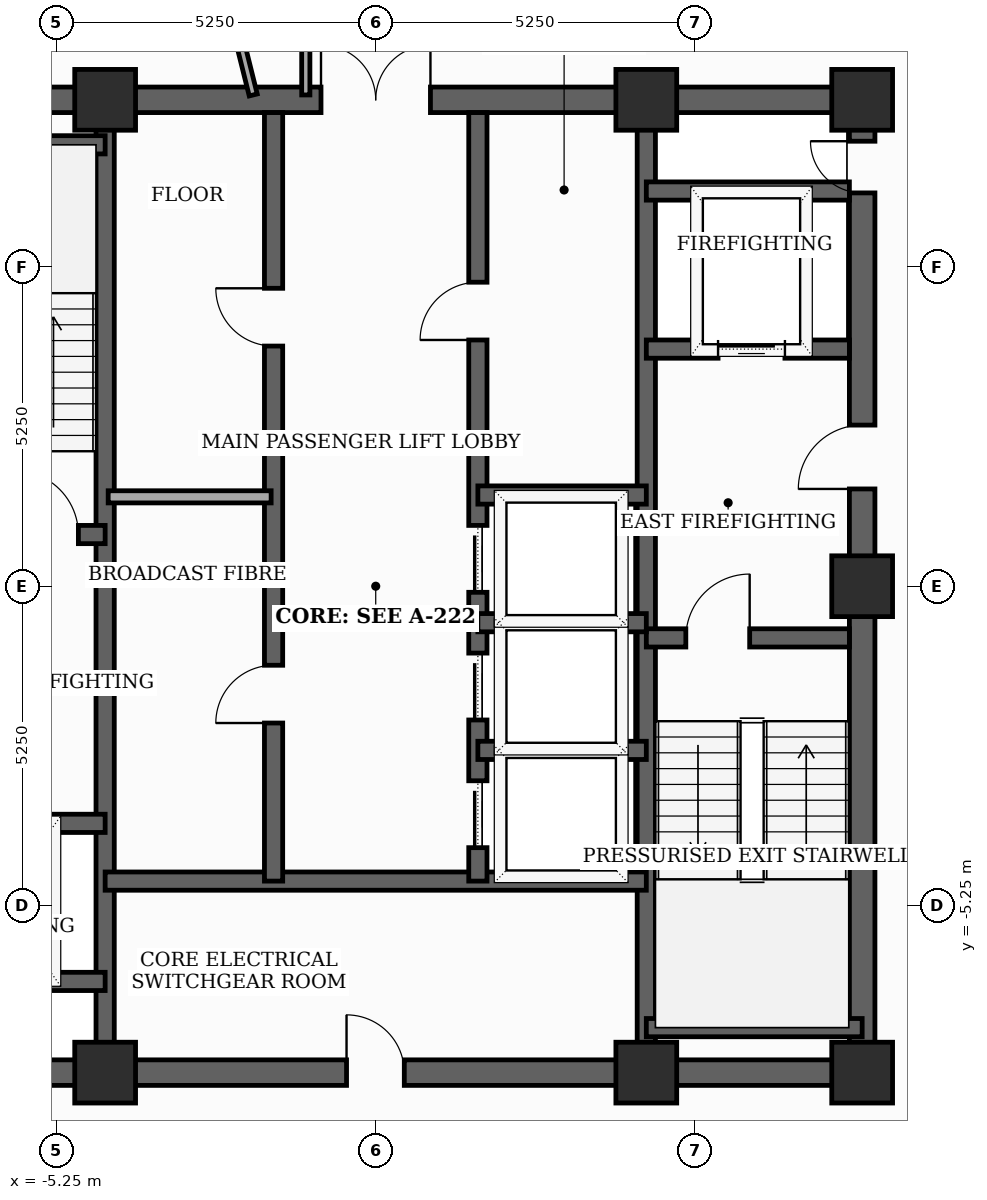
"""IFC4 building model, lengths in metres.
Left out: names, types, materials, properties, quantities, classifications, styles, units other than length and angle.
Written with IfcOpenShell. Run it as: python <this file> out.ifc"""

import sys

from ifc_helpers import new_model, si_unit, direction, frame, frame_2d, origin, origin_2d, place, context, subcontext, project, spatial, rectangle, extrude, element, fill, save


model = new_model("IFC4")
c1 = context("Model", 3, precision=1e-05, world=origin(), true_north=direction((0.0, 1.0)))
c2 = subcontext(c1, "Body", "Model", "MODEL_VIEW")
j1 = project(units=[si_unit("LENGTHUNIT", "METRE"), si_unit("PLANEANGLEUNIT", "RADIAN")], contexts=[c1])
p1 = place(None, origin())
s1 = spatial("IfcSite", under=j1, at=p1, CompositionType="ELEMENT")
p2 = place(p1, origin())
s2 = spatial("IfcBuilding", under=s1, at=p2, CompositionType="ELEMENT")
p3 = place(p2, frame((0.0, 0.0, 248.5)))
s3 = spatial("IfcBuildingStorey", under=s2, at=p3, CompositionType="ELEMENT", Elevation=248.5)
for number, where, z_axis, x_axis in (
    (1, (-4.45, -8.0, 0.0), (0.0, 0.0, 1.0), (1.0, 0.0, 0.0)),
    (2, (4.45, -8.0, 0.0), (0.0, 0.0, 1.0), (1.0, 0.0, 0.0)),
    (3, (8.0, -8.0, 0.0), (0.0, 0.0, 1.0), (1.0, 0.0, 0.0)),
    (4, (8.0, 0.0, 0.0), (0.0, 0.0, 1.0), (1.0, 0.0, 0.0)),
    (5, (8.0, 8.0, 0.0), (0.0, 0.0, 1.0), (1.0, 0.0, 0.0)),
    (6, (4.45, 8.0, 0.0), (0.0, 0.0, 1.0), (1.0, 0.0, 0.0)),
    (7, (-4.45, 8.0, 0.0), (0.0, 0.0, 1.0), (1.0, 0.0, 0.0)),
):
    element("IfcColumn", number, at=place(p3, frame(where, z_axis=z_axis, x_axis=x_axis)), inside=s3, PredefinedType="COLUMN", context=c2, shape_type="SweptSolid", body=[
        extrude(rectangle(XDim=1.0, YDim=1.0, at=origin_2d()), origin(), (0.0, 0.0, 1.0), 3.7),
    ])
p4 = place(p3, frame((8.0, -8.0, 0.0), z_axis=(0.0, 0.0, 1.0), x_axis=(0.0, 1.0, 0.0)))
e8 = element("IfcWall", 8, at=p4, inside=s3, PredefinedType="SHEAR", context=c2, shape_type="SweptSolid", body=[
    extrude(rectangle(XDim=16.0, YDim=0.42, at=frame_2d((8.0, 0.0))), origin(), (0.0, 0.0, 1.0), 3.5),
])
p5 = place(p4, frame((9.6, 0.0, 0.0)))
e9 = element("IfcOpeningElement", 9, at=p5, cuts=e8, PredefinedType="OPENING", context=c2, shape_type="SweptSolid", body=[
    extrude(rectangle(XDim=1.05, YDim=2.15, at=frame_2d((0.525, 1.075))), frame((0.0, 0.22, 0.0), z_axis=(0.0, -1.0, 0.0), x_axis=(1.0, 0.0, 0.0)), (0.0, 0.0, 1.0), 0.44),
])
p6 = place(p4, frame((14.469, 0.0, 0.0)))
e10 = element("IfcOpeningElement", 10, at=p6, cuts=e8, PredefinedType="OPENING", context=c2, shape_type="SweptSolid", body=[
    extrude(rectangle(XDim=0.85, YDim=2.02, at=frame_2d((0.425, 1.01))), frame((0.0, 0.22, 0.0), z_axis=(0.0, -1.0, 0.0), x_axis=(1.0, 0.0, 0.0)), (0.0, 0.0, 1.0), 0.44),
])
p7 = place(p3, frame((-8.0, -8.0, 0.0), z_axis=(0.0, 0.0, 1.0), x_axis=(1.0, 0.0, 0.0)))
e11 = element("IfcWall", 11, at=p7, inside=s3, PredefinedType="SHEAR", context=c2, shape_type="SweptSolid", body=[
    extrude(rectangle(XDim=16.0, YDim=0.42, at=frame_2d((8.0, 0.0))), origin(), (0.0, 0.0, 1.0), 3.5),
])
p8 = place(p7, frame((7.52, 0.0, 0.0)))
e12 = element("IfcOpeningElement", 12, at=p8, cuts=e11, PredefinedType="OPENING", context=c2, shape_type="SweptSolid", body=[
    extrude(rectangle(XDim=0.95, YDim=2.1, at=frame_2d((0.475, 1.05))), frame((0.0, 0.22, 0.0), z_axis=(0.0, -1.0, 0.0), x_axis=(1.0, 0.0, 0.0)), (0.0, 0.0, 1.0), 0.44),
])
p9 = place(p3, frame((-8.0, 8.0, 0.0), z_axis=(0.0, 0.0, 1.0), x_axis=(1.0, 0.0, 0.0)))
e13 = element("IfcWall", 13, at=p9, inside=s3, PredefinedType="SHEAR", context=c2, shape_type="SweptSolid", body=[
    extrude(rectangle(XDim=16.0, YDim=0.42, at=frame_2d((8.0, 0.0))), origin(), (0.0, 0.0, 1.0), 3.5),
])
p10 = place(p9, frame((7.1, 0.0, 0.0)))
e14 = element("IfcOpeningElement", 14, at=p10, cuts=e13, PredefinedType="OPENING", context=c2, shape_type="SweptSolid", body=[
    extrude(rectangle(XDim=1.8, YDim=2.15, at=frame_2d((0.9, 1.075))), frame((0.0, 0.22, 0.0), z_axis=(0.0, -1.0, 0.0), x_axis=(1.0, 0.0, 0.0)), (0.0, 0.0, 1.0), 0.44),
])
for number, where, z_axis, x_axis in (
    (15, (-4.45, -7.79, 0.0), (0.0, 0.0, 1.0), (0.0, 1.0, 0.0)),
    (16, (4.45, -7.79, 0.0), (0.0, 0.0, 1.0), (0.0, 1.0, 0.0)),
):
    element("IfcWall", number, at=place(p3, frame(where, z_axis=z_axis, x_axis=x_axis)), inside=s3, PredefinedType="SHEAR", context=c2, shape_type="SweptSolid", body=[
        extrude(rectangle(XDim=15.58, YDim=0.3, at=frame_2d((7.79, 0.0))), origin(), (0.0, 0.0, 1.0), 3.5),
    ])
p11 = place(p3, frame((-7.79, 0.85, 0.0), z_axis=(0.0, 0.0, 1.0), x_axis=(1.0, 0.0, 0.0)))
e17 = element("IfcWall", 17, at=p11, inside=s3, PredefinedType="SHEAR", context=c2, shape_type="SweptSolid", body=[
    extrude(rectangle(XDim=3.34, YDim=0.3, at=frame_2d((1.67, 0.0))), origin(), (0.0, 0.0, 1.0), 3.5),
])
p12 = place(p11, frame((1.85, 0.0, 0.0)))
e18 = element("IfcOpeningElement", 18, at=p12, cuts=e17, PredefinedType="OPENING", context=c2, shape_type="SweptSolid", body=[
    extrude(rectangle(XDim=1.05, YDim=2.15, at=frame_2d((0.525, 1.075))), frame((0.0, 0.16, 0.0), z_axis=(0.0, -1.0, 0.0), x_axis=(1.0, 0.0, 0.0)), (0.0, 0.0, 1.0), 0.32),
])
p13 = place(p3, frame((-7.79, 7.26, 0.0), z_axis=(0.0, 0.0, 1.0), x_axis=(1.0, 0.0, 0.0)))
e19 = element("IfcWall", 19, at=p13, inside=s3, PredefinedType="SHEAR", context=c2, shape_type="SweptSolid", body=[
    extrude(rectangle(XDim=3.34, YDim=0.3, at=frame_2d((1.67, 0.0))), origin(), (0.0, 0.0, 1.0), 3.5),
])
p14 = place(p3, frame((4.45, -0.85, 0.0), z_axis=(0.0, 0.0, 1.0), x_axis=(1.0, 0.0, 0.0)))
e20 = element("IfcWall", 20, at=p14, inside=s3, PredefinedType="SHEAR", context=c2, shape_type="SweptSolid", body=[
    extrude(rectangle(XDim=3.34, YDim=0.3, at=frame_2d((1.67, 0.0))), origin(), (0.0, 0.0, 1.0), 3.5),
])
p15 = place(p14, frame((0.65, 0.0, 0.0)))
e21 = element("IfcOpeningElement", 21, at=p15, cuts=e20, PredefinedType="OPENING", context=c2, shape_type="SweptSolid", body=[
    extrude(rectangle(XDim=1.05, YDim=2.15, at=frame_2d((0.525, 1.075))), frame((0.0, 0.16, 0.0), z_axis=(0.0, -1.0, 0.0), x_axis=(1.0, 0.0, 0.0)), (0.0, 0.0, 1.0), 0.32),
])
p16 = place(p3, frame((4.45, -7.26, 0.0), z_axis=(0.0, 0.0, 1.0), x_axis=(1.0, 0.0, 0.0)))
e22 = element("IfcWall", 22, at=p16, inside=s3, PredefinedType="SHEAR", context=c2, shape_type="SweptSolid", body=[
    extrude(rectangle(XDim=3.55, YDim=0.3, at=frame_2d((1.775, 0.0))), origin(), (0.0, 0.0, 1.0), 3.5),
])
p17 = place(p3, frame((-7.79, -3.9, 0.0), z_axis=(0.0, 0.0, 1.0), x_axis=(1.0, 0.0, 0.0)))
e23 = element("IfcWall", 23, at=p17, inside=s3, PredefinedType="SHEAR", context=c2, shape_type="SweptSolid", body=[
    extrude(rectangle(XDim=3.34, YDim=0.3, at=frame_2d((1.67, 0.0))), origin(), (0.0, 0.0, 1.0), 3.5),
])
p18 = place(p17, frame((1.27, 0.0, 0.0)))
e24 = element("IfcOpeningElement", 24, at=p18, cuts=e23, PredefinedType="OPENING", context=c2, shape_type="SweptSolid", body=[
    extrude(rectangle(XDim=1.1, YDim=2.1, at=frame_2d((0.55, 1.05))), frame((0.0, 0.16, 0.0), z_axis=(0.0, -1.0, 0.0), x_axis=(1.0, 0.0, 0.0)), (0.0, 0.0, 1.0), 0.32),
])
p19 = place(p3, frame((-7.79, -6.5, 0.0), z_axis=(0.0, 0.0, 1.0), x_axis=(1.0, 0.0, 0.0)))
e25 = element("IfcWall", 25, at=p19, inside=s3, PredefinedType="SHEAR", context=c2, shape_type="SweptSolid", body=[
    extrude(rectangle(XDim=3.34, YDim=0.3, at=frame_2d((1.67, 0.0))), origin(), (0.0, 0.0, 1.0), 3.5),
])
p20 = place(p3, frame((4.45, 3.9, 0.0), z_axis=(0.0, 0.0, 1.0), x_axis=(1.0, 0.0, 0.0)))
e26 = element("IfcWall", 26, at=p20, inside=s3, PredefinedType="SHEAR", context=c2, shape_type="SweptSolid", body=[
    extrude(rectangle(XDim=3.34, YDim=0.3, at=frame_2d((1.67, 0.0))), origin(), (0.0, 0.0, 1.0), 3.5),
])
p21 = place(p20, frame((1.18, 0.0, 0.0)))
e27 = element("IfcOpeningElement", 27, at=p21, cuts=e26, PredefinedType="OPENING", context=c2, shape_type="SweptSolid", body=[
    extrude(rectangle(XDim=1.1, YDim=2.1, at=frame_2d((0.55, 1.05))), frame((0.0, 0.16, 0.0), z_axis=(0.0, -1.0, 0.0), x_axis=(1.0, 0.0, 0.0)), (0.0, 0.0, 1.0), 0.32),
])
p22 = place(p3, frame((4.45, 6.5, 0.0), z_axis=(0.0, 0.0, 1.0), x_axis=(1.0, 0.0, 0.0)))
e28 = element("IfcWall", 28, at=p22, inside=s3, PredefinedType="SHEAR", context=c2, shape_type="SweptSolid", body=[
    extrude(rectangle(XDim=3.34, YDim=0.3, at=frame_2d((1.67, 0.0))), origin(), (0.0, 0.0, 1.0), 3.5),
])
p23 = place(p3, frame((-4.45, -4.85, 0.0), z_axis=(0.0, 0.0, 1.0), x_axis=(1.0, 0.0, 0.0)))
e29 = element("IfcWall", 29, at=p23, inside=s3, PredefinedType="SHEAR", context=c2, shape_type="SweptSolid", body=[
    extrude(rectangle(XDim=8.9, YDim=0.3, at=frame_2d((4.45, 0.0))), origin(), (0.0, 0.0, 1.0), 3.5),
])
p24 = place(p3, frame((-1.68, -4.85, 0.0), z_axis=(0.0, 0.0, 1.0), x_axis=(0.0, 1.0, 0.0)))
e30 = element("IfcWall", 30, at=p24, inside=s3, PredefinedType="SHEAR", context=c2, shape_type="SweptSolid", body=[
    extrude(rectangle(XDim=12.64, YDim=0.3, at=frame_2d((6.32, 0.0))), origin(), (0.0, 0.0, 1.0), 3.5),
])
p25 = place(p24, frame((2.6, 0.0, 0.0)))
e31 = element("IfcOpeningElement", 31, at=p25, cuts=e30, PredefinedType="OPENING", context=c2, shape_type="SweptSolid", body=[
    extrude(rectangle(XDim=0.95, YDim=2.1, at=frame_2d((0.475, 1.05))), frame((0.0, 0.16, 0.0), z_axis=(0.0, -1.0, 0.0), x_axis=(1.0, 0.0, 0.0)), (0.0, 0.0, 1.0), 0.32),
])
p26 = place(p24, frame((8.8, 0.0, 0.0)))
e32 = element("IfcOpeningElement", 32, at=p26, cuts=e30, PredefinedType="OPENING", context=c2, shape_type="SweptSolid", body=[
    extrude(rectangle(XDim=0.95, YDim=2.1, at=frame_2d((0.475, 1.05))), frame((0.0, 0.16, 0.0), z_axis=(0.0, -1.0, 0.0), x_axis=(1.0, 0.0, 0.0)), (0.0, 0.0, 1.0), 0.32),
])
p27 = place(p3, frame((1.68, -4.85, 0.0), z_axis=(0.0, 0.0, 1.0), x_axis=(0.0, 1.0, 0.0)))
e33 = element("IfcWall", 33, at=p27, inside=s3, PredefinedType="SHEAR", context=c2, shape_type="SweptSolid", body=[
    extrude(rectangle(XDim=12.64, YDim=0.3, at=frame_2d((6.32, 0.0))), origin(), (0.0, 0.0, 1.0), 3.5),
])
p28 = place(p27, frame((0.55, 0.0, 0.0)))
e34 = element("IfcOpeningElement", 34, at=p28, cuts=e33, PredefinedType="OPENING", context=c2, shape_type="SweptSolid", body=[
    extrude(rectangle(XDim=1.1, YDim=2.1, at=frame_2d((0.55, 1.05))), frame((0.0, 0.16, 0.0), z_axis=(0.0, -1.0, 0.0), x_axis=(1.0, 0.0, 0.0)), (0.0, 0.0, 1.0), 0.32),
])
p29 = place(p27, frame((2.65, 0.0, 0.0)))
e35 = element("IfcOpeningElement", 35, at=p29, cuts=e33, PredefinedType="OPENING", context=c2, shape_type="SweptSolid", body=[
    extrude(rectangle(XDim=1.1, YDim=2.1, at=frame_2d((0.55, 1.05))), frame((0.0, 0.16, 0.0), z_axis=(0.0, -1.0, 0.0), x_axis=(1.0, 0.0, 0.0)), (0.0, 0.0, 1.0), 0.32),
])
p30 = place(p27, frame((4.75, 0.0, 0.0)))
e36 = element("IfcOpeningElement", 36, at=p30, cuts=e33, PredefinedType="OPENING", context=c2, shape_type="SweptSolid", body=[
    extrude(rectangle(XDim=1.1, YDim=2.1, at=frame_2d((0.55, 1.05))), frame((0.0, 0.16, 0.0), z_axis=(0.0, -1.0, 0.0), x_axis=(1.0, 0.0, 0.0)), (0.0, 0.0, 1.0), 0.32),
])
p31 = place(p27, frame((8.9, 0.0, 0.0)))
e37 = element("IfcOpeningElement", 37, at=p31, cuts=e33, PredefinedType="OPENING", context=c2, shape_type="SweptSolid", body=[
    extrude(rectangle(XDim=0.95, YDim=2.1, at=frame_2d((0.475, 1.05))), frame((0.0, 0.16, 0.0), z_axis=(0.0, -1.0, 0.0), x_axis=(1.0, 0.0, 0.0)), (0.0, 0.0, 1.0), 0.32),
])
for number, where, z_axis, x_axis in (
    (38, (1.68, 1.5, 0.0), (0.0, 0.0, 1.0), (1.0, 0.0, 0.0)),
    (39, (1.68, -2.7, 0.0), (0.0, 0.0, 1.0), (1.0, 0.0, 0.0)),
    (40, (1.68, -0.6, 0.0), (0.0, 0.0, 1.0), (1.0, 0.0, 0.0)),
):
    element("IfcWall", number, at=place(p3, frame(where, z_axis=z_axis, x_axis=x_axis)), inside=s3, PredefinedType="SHEAR", context=c2, shape_type="SweptSolid", body=[
        extrude(rectangle(XDim=2.77, YDim=0.3, at=frame_2d((1.385, 0.0))), origin(), (0.0, 0.0, 1.0), 3.5),
    ])
p32 = place(p3, frame((-4.4, 1.47, 0.0), z_axis=(0.0, 0.0, 1.0), x_axis=(1.0, 0.0, 0.0)))
e41 = element("IfcWall", 41, at=p32, inside=s3, PredefinedType="SOLIDWALL", context=c2, shape_type="SweptSolid", body=[
    extrude(rectangle(XDim=2.68, YDim=0.2, at=frame_2d((1.34, 0.0))), origin(), (0.0, 0.0, 1.0), 3.5),
])
p33 = place(p3, frame((-1.15, 10.65, 0.0), z_axis=(0.0, 0.0, 1.0), x_axis=(0.0, -1.0, 0.0)))
e42 = element("IfcWall", 42, at=p33, inside=s3, PredefinedType="PARTITIONING", context=c2, shape_type="SweptSolid", body=[
    extrude(rectangle(XDim=2.57, YDim=0.135, at=frame_2d((1.285, 0.0))), origin(), (0.0, 0.0, 1.0), 2.885),
])
p34 = place(p3, frame((-3.8, 15.242, 0.0), z_axis=(0.0, 0.0, 1.0), x_axis=(0.241889603588, -0.970303777008, 0.0)))
e43 = element("IfcWall", 43, at=p34, inside=s3, PredefinedType="PARTITIONING", context=c2, shape_type="SweptSolid", body=[
    extrude(rectangle(XDim=7.381, YDim=0.135, at=frame_2d((3.69, 0.0))), origin(), (0.0, 0.0, 1.0), 2.885),
])
p35 = place(p34, frame((3.231, 0.0, 0.0)))
e44 = element("IfcOpeningElement", 44, at=p35, cuts=e43, PredefinedType="OPENING", context=c2, shape_type="SweptSolid", body=[
    extrude(rectangle(XDim=0.92, YDim=2.1, at=frame_2d((0.46, 1.05))), frame((0.0, 0.077, 0.0), z_axis=(0.0, -1.0, 0.0), x_axis=(1.0, 0.0, 0.0)), (0.0, 0.0, 1.0), 0.155),
])
p36 = place(p5, origin())
e45 = element("IfcDoor", 45, at=p36, inside=s3, OperationType="SINGLE_SWING_LEFT", PredefinedType="DOOR", context=c2, shape_type="SweptSolid", body=[
    extrude(rectangle(XDim=1.05, YDim=2.15, at=frame_2d((0.525, 1.075))), frame((0.0, 0.025, 0.0), z_axis=(0.0, -1.0, 0.0), x_axis=(1.0, 0.0, 0.0)), (0.0, 0.0, 1.0), 0.05),
])
fill(e9, e45)
p37 = place(p6, origin())
e46 = element("IfcDoor", 46, at=p37, inside=s3, OperationType="SINGLE_SWING_RIGHT", PredefinedType="TRAPDOOR", context=c2, shape_type="SweptSolid", body=[
    extrude(rectangle(XDim=0.85, YDim=2.02, at=frame_2d((0.425, 1.01))), frame((0.0, 0.025, 0.0), z_axis=(0.0, -1.0, 0.0), x_axis=(1.0, 0.0, 0.0)), (0.0, 0.0, 1.0), 0.05),
])
fill(e10, e46)
p38 = place(p8, origin())
e47 = element("IfcDoor", 47, at=p38, inside=s3, OperationType="SINGLE_SWING_LEFT", PredefinedType="DOOR", context=c2, shape_type="SweptSolid", body=[
    extrude(rectangle(XDim=0.95, YDim=2.1, at=frame_2d((0.475, 1.05))), frame((0.0, 0.025, 0.0), z_axis=(0.0, -1.0, 0.0), x_axis=(1.0, 0.0, 0.0)), (0.0, 0.0, 1.0), 0.05),
])
fill(e12, e47)
p39 = place(p10, origin())
e48 = element("IfcDoor", 48, at=p39, inside=s3, OperationType="DOUBLE_DOOR_SINGLE_SWING", PredefinedType="DOOR", context=c2, shape_type="SweptSolid", body=[
    extrude(rectangle(XDim=1.8, YDim=2.15, at=frame_2d((0.9, 1.075))), frame((0.0, 0.025, 0.0), z_axis=(0.0, -1.0, 0.0), x_axis=(1.0, 0.0, 0.0)), (0.0, 0.0, 1.0), 0.05),
])
fill(e14, e48)
p40 = place(p12, origin())
e49 = element("IfcDoor", 49, at=p40, inside=s3, OperationType="SINGLE_SWING_LEFT", PredefinedType="DOOR", context=c2, shape_type="SweptSolid", body=[
    extrude(rectangle(XDim=1.05, YDim=2.15, at=frame_2d((0.525, 1.075))), frame((0.0, 0.025, 0.0), z_axis=(0.0, -1.0, 0.0), x_axis=(1.0, 0.0, 0.0)), (0.0, 0.0, 1.0), 0.05),
])
fill(e18, e49)
p41 = place(p15, origin())
e50 = element("IfcDoor", 50, at=p41, inside=s3, OperationType="SINGLE_SWING_RIGHT", PredefinedType="DOOR", context=c2, shape_type="SweptSolid", body=[
    extrude(rectangle(XDim=1.05, YDim=2.15, at=frame_2d((0.525, 1.075))), frame((0.0, 0.025, 0.0), z_axis=(0.0, -1.0, 0.0), x_axis=(1.0, 0.0, 0.0)), (0.0, 0.0, 1.0), 0.05),
])
fill(e21, e50)
p42 = place(p21, origin())
e51 = element("IfcDoor", 51, at=p42, inside=s3, OperationType="SLIDING_TO_LEFT", PredefinedType="DOOR", context=c2, shape_type="SweptSolid", body=[
    extrude(rectangle(XDim=1.1, YDim=2.1, at=frame_2d((0.55, 1.05))), frame((0.0, 0.025, 0.0), z_axis=(0.0, -1.0, 0.0), x_axis=(1.0, 0.0, 0.0)), (0.0, 0.0, 1.0), 0.05),
])
fill(e27, e51)
p43 = place(p25, origin())
e52 = element("IfcDoor", 52, at=p43, inside=s3, OperationType="SINGLE_SWING_LEFT", PredefinedType="DOOR", context=c2, shape_type="SweptSolid", body=[
    extrude(rectangle(XDim=0.95, YDim=2.1, at=frame_2d((0.475, 1.05))), frame((0.0, 0.025, 0.0), z_axis=(0.0, -1.0, 0.0), x_axis=(1.0, 0.0, 0.0)), (0.0, 0.0, 1.0), 0.05),
])
fill(e31, e52)
p44 = place(p26, origin())
e53 = element("IfcDoor", 53, at=p44, inside=s3, OperationType="SINGLE_SWING_RIGHT", PredefinedType="DOOR", context=c2, shape_type="SweptSolid", body=[
    extrude(rectangle(XDim=0.95, YDim=2.1, at=frame_2d((0.475, 1.05))), frame((0.0, 0.025, 0.0), z_axis=(0.0, -1.0, 0.0), x_axis=(1.0, 0.0, 0.0)), (0.0, 0.0, 1.0), 0.05),
])
fill(e32, e53)
p45 = place(p28, origin())
e54 = element("IfcDoor", 54, at=p45, inside=s3, OperationType="SLIDING_TO_LEFT", PredefinedType="DOOR", context=c2, shape_type="SweptSolid", body=[
    extrude(rectangle(XDim=1.1, YDim=2.1, at=frame_2d((0.55, 1.05))), frame((0.0, 0.025, 0.0), z_axis=(0.0, -1.0, 0.0), x_axis=(1.0, 0.0, 0.0)), (0.0, 0.0, 1.0), 0.05),
])
fill(e34, e54)
p46 = place(p29, origin())
e55 = element("IfcDoor", 55, at=p46, inside=s3, OperationType="SLIDING_TO_LEFT", PredefinedType="DOOR", context=c2, shape_type="SweptSolid", body=[
    extrude(rectangle(XDim=1.1, YDim=2.1, at=frame_2d((0.55, 1.05))), frame((0.0, 0.025, 0.0), z_axis=(0.0, -1.0, 0.0), x_axis=(1.0, 0.0, 0.0)), (0.0, 0.0, 1.0), 0.05),
])
fill(e35, e55)
p47 = place(p30, origin())
e56 = element("IfcDoor", 56, at=p47, inside=s3, OperationType="SLIDING_TO_LEFT", PredefinedType="DOOR", context=c2, shape_type="SweptSolid", body=[
    extrude(rectangle(XDim=1.1, YDim=2.1, at=frame_2d((0.55, 1.05))), frame((0.0, 0.025, 0.0), z_axis=(0.0, -1.0, 0.0), x_axis=(1.0, 0.0, 0.0)), (0.0, 0.0, 1.0), 0.05),
])
fill(e36, e56)
p48 = place(p31, origin())
e57 = element("IfcDoor", 57, at=p48, inside=s3, OperationType="SINGLE_SWING_LEFT", PredefinedType="DOOR", context=c2, shape_type="SweptSolid", body=[
    extrude(rectangle(XDim=0.95, YDim=2.1, at=frame_2d((0.475, 1.05))), frame((0.0, 0.025, 0.0), z_axis=(0.0, -1.0, 0.0), x_axis=(1.0, 0.0, 0.0)), (0.0, 0.0, 1.0), 0.05),
])
fill(e37, e57)
save(model, sys.argv[1])
